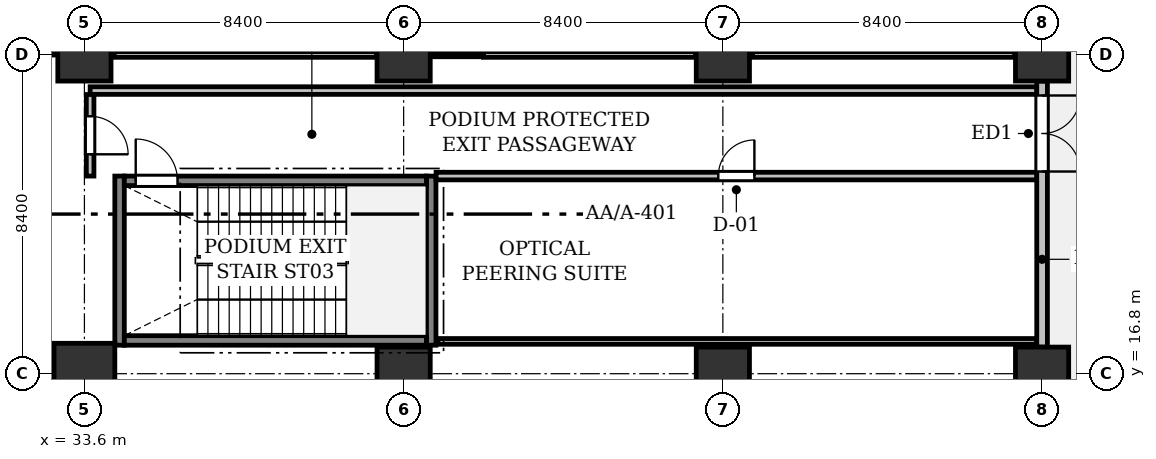
"""IFC4 building model, lengths in metres.
Left out: names, types, materials, properties, quantities, classifications, styles, units other than length and angle.
Written with IfcOpenShell. Run it as: python <this file> out.ifc"""

import sys

from ifc_helpers import new_model, si_unit, direction, frame, frame_2d, origin, origin_2d, place, context, subcontext, project, spatial, rectangle, extrude, element, fill, save


model = new_model("IFC4")
c1 = context("Model", 3, precision=1e-05, world=origin(), true_north=direction((0.0, 1.0)))
c2 = subcontext(c1, "Body", "Model", "MODEL_VIEW")
j1 = project(units=[si_unit("LENGTHUNIT", "METRE"), si_unit("PLANEANGLEUNIT", "RADIAN")], contexts=[c1])
p1 = place(None, origin())
s1 = spatial("IfcSite", under=j1, at=p1, CompositionType="ELEMENT")
p2 = place(p1, origin())
s2 = spatial("IfcBuilding", under=s1, at=p2, CompositionType="ELEMENT")
p3 = place(p2, origin())
s3 = spatial("IfcBuildingStorey", under=s2, at=p3, CompositionType="ELEMENT", Elevation=0.0)
p4 = place(p3, frame((33.6, 16.8, 0.0), z_axis=(0.0, 0.0, 1.0), x_axis=(1.0, 0.0, 0.0)))
e1 = element("IfcColumn", 1, at=p4, inside=s3, PredefinedType="COLUMN", context=c2, shape_type="SweptSolid", body=[
    extrude(rectangle(XDim=1.6, YDim=1.6, at=origin_2d()), origin(), (0.0, 0.0, 1.0), 5.4),
])
for number, where, z_axis, x_axis in (
    (2, (33.6, 25.2, 0.0), (0.0, 0.0, 1.0), (1.0, 0.0, 0.0)),
    (3, (42.0, 16.8, 0.0), (0.0, 0.0, 1.0), (1.0, 0.0, 0.0)),
    (4, (42.0, 25.2, 0.0), (0.0, 0.0, 1.0), (1.0, 0.0, 0.0)),
    (5, (50.4, 16.8, 0.0), (0.0, 0.0, 1.0), (1.0, 0.0, 0.0)),
    (6, (50.4, 25.2, 0.0), (0.0, 0.0, 1.0), (1.0, 0.0, 0.0)),
    (7, (58.8, 16.8, 0.0), (0.0, 0.0, 1.0), (1.0, 0.0, 0.0)),
    (8, (58.8, 25.2, 0.0), (0.0, 0.0, 1.0), (1.0, 0.0, 0.0)),
):
    element("IfcColumn", number, at=place(p3, frame(where, z_axis=z_axis, x_axis=x_axis)), inside=s3, PredefinedType="COLUMN", context=c2, shape_type="SweptSolid", body=[
        extrude(rectangle(XDim=1.4, YDim=1.4, at=origin_2d()), origin(), (0.0, 0.0, 1.0), 5.4),
    ])
p5 = place(p3, frame((58.8, 24.5, 0.0), z_axis=(0.0, 0.0, 1.0), x_axis=(0.0, -1.0, 0.0)))
e9 = element("IfcWall", 9, at=p5, inside=s3, PredefinedType="STANDARD", context=c2, shape_type="SweptSolid", body=[
    extrude(rectangle(XDim=7.0, YDim=0.28, at=frame_2d((3.5, 0.0))), origin(), (0.0, 0.0, 1.0), 4.513),
])
p6 = place(p5, frame((0.38, 0.0, 0.0)))
e10 = element("IfcOpeningElement", 10, at=p6, cuts=e9, PredefinedType="OPENING", context=c2, shape_type="SweptSolid", body=[
    extrude(rectangle(XDim=2.0, YDim=2.4, at=frame_2d((1.0, 1.2))), frame((0.0, 0.15, 0.0), z_axis=(0.0, -1.0, 0.0), x_axis=(1.0, 0.0, 0.0)), (0.0, 0.0, 1.0), 0.3),
])
p7 = place(p3, frame((26.0, 16.8, 0.0), z_axis=(0.0, 0.0, 1.0), x_axis=(1.0, 0.0, 0.0)))
e11 = element("IfcWall", 11, at=p7, inside=s3, PredefinedType="SHEAR", context=c2, shape_type="SweptSolid", body=[
    extrude(rectangle(XDim=6.8, YDim=0.65, at=frame_2d((3.4, 0.0))), origin(), (0.0, 0.0, 1.0), 5.125),
])
for number, where, z_axis, x_axis in (
    (12, (34.525, 17.55, 0.0), (0.0, 0.0, 1.0), (0.0, 1.0, 0.0)),
    (13, (42.725, 17.55, 0.0), (0.0, 0.0, 1.0), (0.0, 1.0, 0.0)),
):
    element("IfcWall", number, at=place(p3, frame(where, z_axis=z_axis, x_axis=x_axis)), inside=s3, PredefinedType="SHEAR", context=c2, shape_type="SweptSolid", body=[
        extrude(rectangle(XDim=4.45, YDim=0.25, at=frame_2d((2.225, 0.0))), origin(), (0.0, 0.0, 1.0), 5.125),
    ])
p8 = place(p3, frame((34.65, 17.675, 0.0), z_axis=(0.0, 0.0, 1.0), x_axis=(1.0, 0.0, 0.0)))
e14 = element("IfcWall", 14, at=p8, inside=s3, PredefinedType="SHEAR", context=c2, shape_type="SweptSolid", body=[
    extrude(rectangle(XDim=7.95, YDim=0.25, at=frame_2d((3.975, 0.0))), origin(), (0.0, 0.0, 1.0), 5.125),
])
p9 = place(p3, frame((34.65, 21.875, 0.0), z_axis=(0.0, 0.0, 1.0), x_axis=(1.0, 0.0, 0.0)))
e15 = element("IfcWall", 15, at=p9, inside=s3, PredefinedType="SHEAR", context=c2, shape_type="SweptSolid", body=[
    extrude(rectangle(XDim=7.95, YDim=0.25, at=frame_2d((3.975, 0.0))), origin(), (0.0, 0.0, 1.0), 5.125),
])
p10 = place(p9, frame((0.3, 0.0, 0.0)))
e16 = element("IfcOpeningElement", 16, at=p10, cuts=e15, PredefinedType="OPENING", context=c2, shape_type="SweptSolid", body=[
    extrude(rectangle(XDim=1.1, YDim=2.15, at=frame_2d((0.55, 1.075))), frame((0.0, 0.135, 0.0), z_axis=(0.0, -1.0, 0.0), x_axis=(1.0, 0.0, 0.0)), (0.0, 0.0, 1.0), 0.27),
])
p11 = place(p3, frame((58.656, 24.25, 0.0), z_axis=(0.0, 0.0, 1.0), x_axis=(-1.0, 0.0, 0.0)))
e17 = element("IfcWall", 17, at=p11, inside=s3, PredefinedType="PARTITIONING", context=c2, shape_type="SweptSolid", body=[
    extrude(rectangle(XDim=24.906, YDim=0.2, at=frame_2d((12.453, 0.0))), origin(), (0.0, 0.0, 1.0), 4.513),
])
p12 = place(p3, frame((33.75, 24.146, 0.0), z_axis=(0.0, 0.0, 1.0), x_axis=(0.0, -1.0, 0.0)))
e18 = element("IfcWall", 18, at=p12, inside=s3, PredefinedType="PARTITIONING", context=c2, shape_type="SweptSolid", body=[
    extrude(rectangle(XDim=2.146, YDim=0.2, at=frame_2d((1.073, 0.0))), origin(), (0.0, 0.0, 1.0), 4.513),
])
p13 = place(p12, frame((0.573, 0.0, 0.0)))
e19 = element("IfcOpeningElement", 19, at=p13, cuts=e18, PredefinedType="OPENING", context=c2, shape_type="SweptSolid", body=[
    extrude(rectangle(XDim=1.0, YDim=2.15, at=frame_2d((0.5, 1.075))), frame((0.0, 0.11, 0.0), z_axis=(0.0, -1.0, 0.0), x_axis=(1.0, 0.0, 0.0)), (0.0, 0.0, 1.0), 0.22),
])
p14 = place(p3, frame((42.854, 22.0, 0.0), z_axis=(0.0, 0.0, 1.0), x_axis=(1.0, 0.0, 0.0)))
e20 = element("IfcWall", 20, at=p14, inside=s3, PredefinedType="PARTITIONING", context=c2, shape_type="SweptSolid", body=[
    extrude(rectangle(XDim=15.802, YDim=0.2, at=frame_2d((7.901, 0.0))), origin(), (0.0, 0.0, 1.0), 4.513),
])
p15 = place(p14, frame((7.426, 0.0, 0.0)))
e21 = element("IfcOpeningElement", 21, at=p15, cuts=e20, PredefinedType="OPENING", context=c2, shape_type="SweptSolid", body=[
    extrude(rectangle(XDim=0.95, YDim=2.15, at=frame_2d((0.475, 1.075))), frame((0.0, 0.11, 0.0), z_axis=(0.0, -1.0, 0.0), x_axis=(1.0, 0.0, 0.0)), (0.0, 0.0, 1.0), 0.22),
])
p16 = place(p3, frame((34.32, 25.9, 0.0), z_axis=(0.0, 0.0, 1.0), x_axis=(0.0, -1.0, 0.0)))
e22 = element("IfcWall", 22, at=p16, inside=s3, PredefinedType="PARTITIONING", context=c2, shape_type="SweptSolid", body=[
    extrude(rectangle(XDim=0.7, YDim=0.12, at=frame_2d((0.35, 0.0))), origin(), (0.0, 0.0, 1.0), 4.325),
])
p17 = place(p3, frame((34.384, 25.2, 0.0), z_axis=(0.0, 0.0, 1.0), x_axis=(1.0, 0.0, 0.0)))
e23 = element("IfcWall", 23, at=p17, inside=s3, PredefinedType="PARTITIONING", context=c2, shape_type="SweptSolid", body=[
    extrude(rectangle(XDim=6.896, YDim=0.15, at=frame_2d((3.448, 0.0))), origin(), (0.0, 0.0, 1.0), 4.325),
])
p18 = place(p3, frame((42.72, 25.9, 0.0), z_axis=(0.0, 0.0, 1.0), x_axis=(0.0, -1.0, 0.0)))
e24 = element("IfcWall", 24, at=p18, inside=s3, PredefinedType="PARTITIONING", context=c2, shape_type="SweptSolid", body=[
    extrude(rectangle(XDim=0.7, YDim=0.12, at=frame_2d((0.35, 0.0))), origin(), (0.0, 0.0, 1.0), 4.325),
])
p19 = place(p3, frame((42.784, 25.2, 0.0), z_axis=(0.0, 0.0, 1.0), x_axis=(1.0, 0.0, 0.0)))
e25 = element("IfcWall", 25, at=p19, inside=s3, PredefinedType="PARTITIONING", context=c2, shape_type="SweptSolid", body=[
    extrude(rectangle(XDim=1.216, YDim=0.12, at=frame_2d((0.608, 0.0))), origin(), (0.0, 0.0, 1.0), 4.325),
])
p20 = place(p3, frame((25.984, 25.26, 0.0), z_axis=(0.0, 0.0, 1.0), x_axis=(1.0, 0.0, 0.0)))
e26 = element("IfcWall", 26, at=p20, inside=s3, PredefinedType="PARTITIONING", context=c2, shape_type="SweptSolid", body=[
    extrude(rectangle(XDim=6.832, YDim=0.15, at=frame_2d((3.416, 0.0))), origin(), (0.0, 0.0, 1.0), 4.325),
])
p21 = place(p3, frame((44.1, 25.2, 0.0), z_axis=(0.0, 0.0, 1.0), x_axis=(1.0, 0.0, 0.0)))
e27 = element("IfcWall", 27, at=p21, inside=s3, PredefinedType="PARTITIONING", context=c2, shape_type="SweptSolid", body=[
    extrude(rectangle(XDim=5.58, YDim=0.15, at=frame_2d((2.79, 0.0))), origin(), (0.0, 0.0, 1.0), 4.325),
])
p22 = place(p3, frame((51.12, 25.9, 0.0), z_axis=(0.0, 0.0, 1.0), x_axis=(0.0, -1.0, 0.0)))
e28 = element("IfcWall", 28, at=p22, inside=s3, PredefinedType="PARTITIONING", context=c2, shape_type="SweptSolid", body=[
    extrude(rectangle(XDim=0.7, YDim=0.12, at=frame_2d((0.35, 0.0))), origin(), (0.0, 0.0, 1.0), 4.325),
])
p23 = place(p3, frame((51.184, 25.2, 0.0), z_axis=(0.0, 0.0, 1.0), x_axis=(1.0, 0.0, 0.0)))
e29 = element("IfcWall", 29, at=p23, inside=s3, PredefinedType="PARTITIONING", context=c2, shape_type="SweptSolid", body=[
    extrude(rectangle(XDim=6.896, YDim=0.15, at=frame_2d((3.448, 0.0))), origin(), (0.0, 0.0, 1.0), 4.325),
])
p24 = place(p3, frame((42.9, 17.65, 0.0), z_axis=(0.0, 0.0, 1.0), x_axis=(1.0, 0.0, 0.0)))
e30 = element("IfcWall", 30, at=p24, inside=s3, PredefinedType="PARTITIONING", context=c2, shape_type="SweptSolid", body=[
    extrude(rectangle(XDim=15.756, YDim=0.15, at=frame_2d((7.878, 0.0))), origin(), (0.0, 0.0, 1.0), 4.513),
])
p25 = place(p6, origin())
e31 = element("IfcDoor", 31, at=p25, inside=s3, OperationType="DOUBLE_DOOR_SINGLE_SWING", PredefinedType="DOOR", context=c2, shape_type="SweptSolid", body=[
    extrude(rectangle(XDim=2.0, YDim=2.4, at=frame_2d((1.0, 1.2))), frame((0.0, 0.025, 0.0), z_axis=(0.0, -1.0, 0.0), x_axis=(1.0, 0.0, 0.0)), (0.0, 0.0, 1.0), 0.05),
])
fill(e10, e31)
p26 = place(p10, origin())
e32 = element("IfcDoor", 32, at=p26, inside=s3, OperationType="SINGLE_SWING_LEFT", PredefinedType="DOOR", context=c2, shape_type="SweptSolid", body=[
    extrude(rectangle(XDim=1.1, YDim=2.15, at=frame_2d((0.55, 1.075))), frame((0.0, 0.025, 0.0), z_axis=(0.0, -1.0, 0.0), x_axis=(1.0, 0.0, 0.0)), (0.0, 0.0, 1.0), 0.05),
])
fill(e16, e32)
p27 = place(p13, origin())
e33 = element("IfcDoor", 33, at=p27, inside=s3, OperationType="SINGLE_SWING_RIGHT", PredefinedType="DOOR", context=c2, shape_type="SweptSolid", body=[
    extrude(rectangle(XDim=1.0, YDim=2.15, at=frame_2d((0.5, 1.075))), frame((0.0, 0.025, 0.0), z_axis=(0.0, -1.0, 0.0), x_axis=(1.0, 0.0, 0.0)), (0.0, 0.0, 1.0), 0.05),
])
fill(e19, e33)
p28 = place(p15, origin())
e34 = element("IfcDoor", 34, at=p28, inside=s3, OperationType="SINGLE_SWING_RIGHT", PredefinedType="DOOR", context=c2, shape_type="SweptSolid", body=[
    extrude(rectangle(XDim=0.95, YDim=2.15, at=frame_2d((0.475, 1.075))), frame((0.0, 0.025, 0.0), z_axis=(0.0, -1.0, 0.0), x_axis=(1.0, 0.0, 0.0)), (0.0, 0.0, 1.0), 0.05),
])
fill(e21, e34)
save(model, sys.argv[1])
